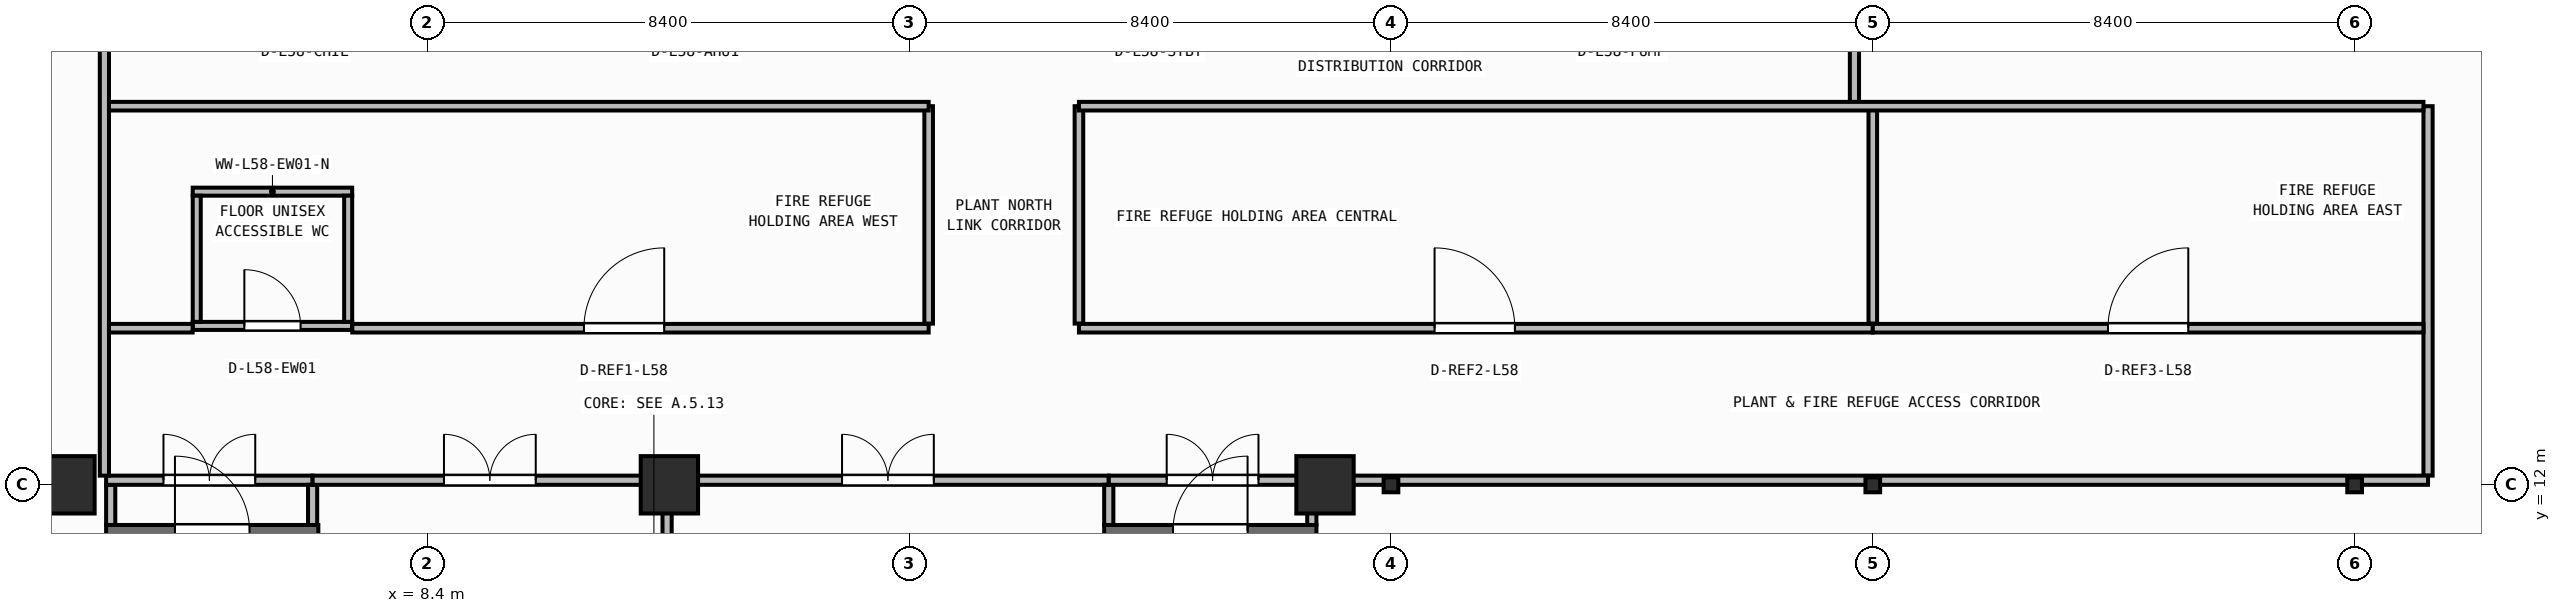
"""IFC4 building model, lengths in metres.
Left out: names, types, materials, properties, quantities, classifications, styles, units other than length and angle.
Written with IfcOpenShell. Run it as: python <this file> out.ifc"""

import sys

from ifc_helpers import new_model, si_unit, direction, frame, frame_2d, origin, origin_2d, place, context, subcontext, project, spatial, rectangle, i_section, extrude, element, fill, save


model = new_model("IFC4")
c1 = context("Model", 3, precision=1e-05, world=origin(), true_north=direction((0.0, 1.0)))
c2 = subcontext(c1, "Body", "Model", "MODEL_VIEW")
j1 = project(units=[si_unit("LENGTHUNIT", "METRE"), si_unit("PLANEANGLEUNIT", "RADIAN")], contexts=[c1])
p1 = place(None, origin())
s1 = spatial("IfcSite", under=j1, at=p1, CompositionType="ELEMENT")
p2 = place(p1, origin())
s2 = spatial("IfcBuilding", under=s1, at=p2, CompositionType="ELEMENT")
p3 = place(p2, frame((0.0, 0.0, 235.55)))
s3 = spatial("IfcBuildingStorey", under=s2, at=p3, CompositionType="ELEMENT", Elevation=235.55)
for number, where, z_axis, x_axis in (
    (1, (2.1, 12.0, 0.0), (0.0, 0.0, 1.0), (1.0, 0.0, 0.0)),
    (2, (12.62, 12.0, 0.0), (0.0, 0.0, 1.0), (1.0, 0.0, 0.0)),
    (3, (24.05, 12.0, 0.0), (0.0, 0.0, 1.0), (1.0, 0.0, 0.0)),
):
    element("IfcColumn", number, at=place(p3, frame(where, z_axis=z_axis, x_axis=x_axis)), inside=s3, PredefinedType="COLUMN", context=c2, shape_type="SweptSolid", body=[
        extrude(rectangle(XDim=1.0, YDim=1.0, at=origin_2d()), origin(), (0.0, 0.0, 1.0), 5.2),
    ])
for number, where, z_axis, x_axis in (
    (4, (25.2, 12.0, 0.0), (0.0, 0.0, 1.0), (1.0, 0.0, 0.0)),
    (5, (33.6, 12.0, 0.0), (0.0, 0.0, 1.0), (1.0, 0.0, 0.0)),
    (6, (42.0, 12.0, 0.0), (0.0, 0.0, 1.0), (1.0, 0.0, 0.0)),
):
    element("IfcColumn", number, at=place(p3, frame(where, z_axis=z_axis, x_axis=x_axis)), inside=s3, PredefinedType="COLUMN", context=c2, shape_type="SweptSolid", body=[
        extrude(i_section(OverallWidth=0.256, OverallDepth=0.26, WebThickness=0.01, FlangeThickness=0.017, FilletRadius=0.013, at=origin_2d()), origin(), (0.0, 0.0, 1.0), 5.2),
    ])
p4 = place(p3, frame((2.8, 11.2, 0.0), z_axis=(0.0, 0.0, 1.0), x_axis=(1.0, 0.0, 0.0)))
e7 = element("IfcWall", 7, at=p4, inside=s3, PredefinedType="SHEAR", context=c2, shape_type="SweptSolid", body=[
    extrude(rectangle(XDim=3.7, YDim=0.2, at=frame_2d((1.85, 0.0))), origin(), (0.0, 0.0, 1.0), 4.96),
])
p5 = place(p4, frame((1.2, 0.0, 0.0)))
e8 = element("IfcOpeningElement", 8, at=p5, cuts=e7, PredefinedType="OPENING", context=c2, shape_type="SweptSolid", body=[
    extrude(rectangle(XDim=1.3, YDim=2.15, at=frame_2d((0.65, 1.075))), frame((0.0, 0.11, 0.0), z_axis=(0.0, -1.0, 0.0), x_axis=(1.0, 0.0, 0.0)), (0.0, 0.0, 1.0), 0.22),
])
p6 = place(p3, frame((20.2, 11.2, 0.0), z_axis=(0.0, 0.0, 1.0), x_axis=(1.0, 0.0, 0.0)))
e9 = element("IfcWall", 9, at=p6, inside=s3, PredefinedType="SHEAR", context=c2, shape_type="SweptSolid", body=[
    extrude(rectangle(XDim=3.7, YDim=0.2, at=frame_2d((1.85, 0.0))), origin(), (0.0, 0.0, 1.0), 4.96),
])
p7 = place(p6, frame((1.2, 0.0, 0.0)))
e10 = element("IfcOpeningElement", 10, at=p7, cuts=e9, PredefinedType="OPENING", context=c2, shape_type="SweptSolid", body=[
    extrude(rectangle(XDim=1.3, YDim=2.15, at=frame_2d((0.65, 1.075))), frame((0.0, 0.11, 0.0), z_axis=(0.0, -1.0, 0.0), x_axis=(1.0, 0.0, 0.0)), (0.0, 0.0, 1.0), 0.22),
])
p8 = place(p3, frame((2.88, 11.3, 0.0), z_axis=(0.0, 0.0, 1.0), x_axis=(0.0, 1.0, 0.0)))
e11 = element("IfcWall", 11, at=p8, inside=s3, PredefinedType="PARTITIONING", context=c2, shape_type="SweptSolid", body=[
    extrude(rectangle(XDim=0.7, YDim=0.16, at=frame_2d((0.35, 0.0))), origin(), (0.0, 0.0, 1.0), 4.96),
])
p9 = place(p3, frame((2.8, 12.08, 0.0), z_axis=(0.0, 0.0, 1.0), x_axis=(1.0, 0.0, 0.0)))
e12 = element("IfcWall", 12, at=p9, inside=s3, PredefinedType="PARTITIONING", context=c2, shape_type="SweptSolid", body=[
    extrude(rectangle(XDim=3.6, YDim=0.16, at=frame_2d((1.8, 0.0))), origin(), (0.0, 0.0, 1.0), 4.235),
])
p10 = place(p9, frame((1.0, 0.0, 0.0)))
e13 = element("IfcOpeningElement", 13, at=p10, cuts=e12, PredefinedType="OPENING", context=c2, shape_type="SweptSolid", body=[
    extrude(rectangle(XDim=1.6, YDim=2.05, at=frame_2d((0.8, 1.025))), frame((0.0, 0.09, 0.0), z_axis=(0.0, -1.0, 0.0), x_axis=(1.0, 0.0, 0.0)), (0.0, 0.0, 1.0), 0.18),
])
p11 = place(p3, frame((6.4, 11.3, 0.0), z_axis=(0.0, 0.0, 1.0), x_axis=(0.0, 1.0, 0.0)))
e14 = element("IfcWall", 14, at=p11, inside=s3, PredefinedType="PARTITIONING", context=c2, shape_type="SweptSolid", body=[
    extrude(rectangle(XDim=0.7, YDim=0.16, at=frame_2d((0.35, 0.0))), origin(), (0.0, 0.0, 1.0), 4.96),
])
p12 = place(p3, frame((6.4, 12.08, 0.0), z_axis=(0.0, 0.0, 1.0), x_axis=(1.0, 0.0, 0.0)))
e15 = element("IfcWall", 15, at=p12, inside=s3, PredefinedType="PARTITIONING", context=c2, shape_type="SweptSolid", body=[
    extrude(rectangle(XDim=6.18, YDim=0.16, at=frame_2d((3.09, 0.0))), origin(), (0.0, 0.0, 1.0), 4.235),
])
p13 = place(p12, frame((2.29, 0.0, 0.0)))
e16 = element("IfcOpeningElement", 16, at=p13, cuts=e15, PredefinedType="OPENING", context=c2, shape_type="SweptSolid", body=[
    extrude(rectangle(XDim=1.6, YDim=2.05, at=frame_2d((0.8, 1.025))), frame((0.0, 0.09, 0.0), z_axis=(0.0, -1.0, 0.0), x_axis=(1.0, 0.0, 0.0)), (0.0, 0.0, 1.0), 0.18),
])
p14 = place(p3, frame((12.58, 9.21, 0.0), z_axis=(0.0, 0.0, 1.0), x_axis=(0.0, 1.0, 0.0)))
e17 = element("IfcWall", 17, at=p14, inside=s3, PredefinedType="PARTITIONING", context=c2, shape_type="SweptSolid", body=[
    extrude(rectangle(XDim=2.79, YDim=0.16, at=frame_2d((1.395, 0.0))), origin(), (0.0, 0.0, 1.0), 4.96),
])
p15 = place(p3, frame((12.58, 12.08, 0.0), z_axis=(0.0, 0.0, 1.0), x_axis=(1.0, 0.0, 0.0)))
e18 = element("IfcWall", 18, at=p15, inside=s3, PredefinedType="PARTITIONING", context=c2, shape_type="SweptSolid", body=[
    extrude(rectangle(XDim=7.7, YDim=0.16, at=frame_2d((3.85, 0.0))), origin(), (0.0, 0.0, 1.0), 4.235),
])
p16 = place(p15, frame((3.05, 0.0, 0.0)))
e19 = element("IfcOpeningElement", 19, at=p16, cuts=e18, PredefinedType="OPENING", context=c2, shape_type="SweptSolid", body=[
    extrude(rectangle(XDim=1.6, YDim=2.05, at=frame_2d((0.8, 1.025))), frame((0.0, 0.09, 0.0), z_axis=(0.0, -1.0, 0.0), x_axis=(1.0, 0.0, 0.0)), (0.0, 0.0, 1.0), 0.18),
])
p17 = place(p3, frame((20.28, 11.3, 0.0), z_axis=(0.0, 0.0, 1.0), x_axis=(0.0, 1.0, 0.0)))
e20 = element("IfcWall", 20, at=p17, inside=s3, PredefinedType="PARTITIONING", context=c2, shape_type="SweptSolid", body=[
    extrude(rectangle(XDim=0.7, YDim=0.16, at=frame_2d((0.35, 0.0))), origin(), (0.0, 0.0, 1.0), 4.96),
])
p18 = place(p3, frame((20.28, 12.08, 0.0), z_axis=(0.0, 0.0, 1.0), x_axis=(1.0, 0.0, 0.0)))
e21 = element("IfcWall", 21, at=p18, inside=s3, PredefinedType="PARTITIONING", context=c2, shape_type="SweptSolid", body=[
    extrude(rectangle(XDim=3.62, YDim=0.16, at=frame_2d((1.81, 0.0))), origin(), (0.0, 0.0, 1.0), 4.235),
])
p19 = place(p18, frame((1.01, 0.0, 0.0)))
e22 = element("IfcOpeningElement", 22, at=p19, cuts=e21, PredefinedType="OPENING", context=c2, shape_type="SweptSolid", body=[
    extrude(rectangle(XDim=1.6, YDim=2.05, at=frame_2d((0.8, 1.025))), frame((0.0, 0.09, 0.0), z_axis=(0.0, -1.0, 0.0), x_axis=(1.0, 0.0, 0.0)), (0.0, 0.0, 1.0), 0.18),
])
p20 = place(p3, frame((23.82, 11.3, 0.0), z_axis=(0.0, 0.0, 1.0), x_axis=(0.0, 1.0, 0.0)))
e23 = element("IfcWall", 23, at=p20, inside=s3, PredefinedType="PARTITIONING", context=c2, shape_type="SweptSolid", body=[
    extrude(rectangle(XDim=0.7, YDim=0.16, at=frame_2d((0.35, 0.0))), origin(), (0.0, 0.0, 1.0), 4.96),
])
p21 = place(p3, frame((4.31, 14.77, 0.0), z_axis=(0.0, 0.0, 1.0), x_axis=(1.0, 0.0, 0.0)))
e24 = element("IfcWall", 24, at=p21, inside=s3, PredefinedType="PARTITIONING", context=c2, shape_type="SweptSolid", body=[
    extrude(rectangle(XDim=2.78, YDim=0.14, at=frame_2d((1.39, 0.0))), origin(), (0.0, 0.0, 1.0), 4.96),
])
p22 = place(p21, frame((0.9, 0.0, 0.0)))
e25 = element("IfcOpeningElement", 25, at=p22, cuts=e24, PredefinedType="OPENING", context=c2, shape_type="SweptSolid", body=[
    extrude(rectangle(XDim=0.98, YDim=2.1, at=frame_2d((0.49, 1.05))), frame((0.0, 0.08, 0.0), z_axis=(0.0, -1.0, 0.0), x_axis=(1.0, 0.0, 0.0)), (0.0, 0.0, 1.0), 0.16),
])
p23 = place(p3, frame((4.31, 17.11, 0.0), z_axis=(0.0, 0.0, 1.0), x_axis=(1.0, 0.0, 0.0)))
e26 = element("IfcWall", 26, at=p23, inside=s3, PredefinedType="PARTITIONING", context=c2, shape_type="SweptSolid", body=[
    extrude(rectangle(XDim=2.78, YDim=0.14, at=frame_2d((1.39, 0.0))), origin(), (0.0, 0.0, 1.0), 4.96),
])
for number, where, z_axis, x_axis in (
    (27, (4.38, 14.84, 0.0), (0.0, 0.0, 1.0), (0.0, 1.0, 0.0)),
    (28, (7.02, 14.84, 0.0), (0.0, 0.0, 1.0), (0.0, 1.0, 0.0)),
):
    element("IfcWall", number, at=place(p3, frame(where, z_axis=z_axis, x_axis=x_axis)), inside=s3, PredefinedType="PARTITIONING", context=c2, shape_type="SweptSolid", body=[
        extrude(rectangle(XDim=2.2, YDim=0.14, at=frame_2d((1.1, 0.0))), origin(), (0.0, 0.0, 1.0), 4.96),
    ])
p24 = place(p3, frame((2.77, 12.16, 0.0), z_axis=(0.0, 0.0, 1.0), x_axis=(0.0, 1.0, 0.0)))
e29 = element("IfcWall", 29, at=p24, inside=s3, PredefinedType="PARTITIONING", context=c2, shape_type="SweptSolid", body=[
    extrude(rectangle(XDim=16.04, YDim=0.16, at=frame_2d((8.02, 0.0))), origin(), (0.0, 0.0, 1.0), 4.96),
])
p25 = place(p3, frame((33.28, 18.6, 0.0), z_axis=(0.0, 0.0, 1.0), x_axis=(0.0, 1.0, 0.0)))
e30 = element("IfcWall", 30, at=p25, inside=s3, PredefinedType="PARTITIONING", context=c2, shape_type="SweptSolid", body=[
    extrude(rectangle(XDim=9.6, YDim=0.16, at=frame_2d((4.8, 0.0))), origin(), (0.0, 0.0, 1.0), 4.407),
])
p26 = place(p3, frame((43.28, 12.16, 0.0), z_axis=(0.0, 0.0, 1.0), x_axis=(0.0, 1.0, 0.0)))
e31 = element("IfcWall", 31, at=p26, inside=s3, PredefinedType="PARTITIONING", context=c2, shape_type="SweptSolid", body=[
    extrude(rectangle(XDim=6.44, YDim=0.16, at=frame_2d((3.22, 0.0))), origin(), (0.0, 0.0, 1.0), 4.96),
])
p27 = place(p3, frame((23.92, 12.08, 0.0), z_axis=(0.0, 0.0, 1.0), x_axis=(1.0, 0.0, 0.0)))
e32 = element("IfcWall", 32, at=p27, inside=s3, PredefinedType="PARTITIONING", context=c2, shape_type="SweptSolid", body=[
    extrude(rectangle(XDim=19.36, YDim=0.16, at=frame_2d((9.68, 0.0))), origin(), (0.0, 0.0, 1.0), 4.235),
])
p28 = place(p3, frame((2.85, 14.73, 0.0), z_axis=(0.0, 0.0, 1.0), x_axis=(1.0, 0.0, 0.0)))
e33 = element("IfcWall", 33, at=p28, inside=s3, PredefinedType="PARTITIONING", context=c2, shape_type="SweptSolid", body=[
    extrude(rectangle(XDim=1.458, YDim=0.15, at=frame_2d((0.729, 0.0))), origin(), (0.0, 0.0, 1.0), 4.96),
])
p29 = place(p3, frame((7.092, 14.73, 0.0), z_axis=(0.0, 0.0, 1.0), x_axis=(1.0, 0.0, 0.0)))
e34 = element("IfcWall", 34, at=p29, inside=s3, PredefinedType="PARTITIONING", context=c2, shape_type="SweptSolid", body=[
    extrude(rectangle(XDim=10.048, YDim=0.15, at=frame_2d((5.024, 0.0))), origin(), (0.0, 0.0, 1.0), 4.96),
])
p30 = place(p29, frame((4.038, 0.0, 0.0)))
e35 = element("IfcOpeningElement", 35, at=p30, cuts=e34, PredefinedType="OPENING", context=c2, shape_type="SweptSolid", body=[
    extrude(rectangle(XDim=1.4, YDim=2.15, at=frame_2d((0.7, 1.075))), frame((0.0, 0.085, 0.0), z_axis=(0.0, -1.0, 0.0), x_axis=(1.0, 0.0, 0.0)), (0.0, 0.0, 1.0), 0.17),
])
p31 = place(p3, frame((17.14, 14.81, 0.0), z_axis=(0.0, 0.0, 1.0), x_axis=(0.0, 1.0, 0.0)))
e36 = element("IfcWall", 36, at=p31, inside=s3, PredefinedType="PARTITIONING", context=c2, shape_type="SweptSolid", body=[
    extrude(rectangle(XDim=3.79, YDim=0.15, at=frame_2d((1.895, 0.0))), origin(), (0.0, 0.0, 1.0), 4.96),
])
p32 = place(p3, frame((2.85, 18.6, 0.0), z_axis=(0.0, 0.0, 1.0), x_axis=(1.0, 0.0, 0.0)))
e37 = element("IfcWall", 37, at=p32, inside=s3, PredefinedType="PARTITIONING", context=c2, shape_type="SweptSolid", body=[
    extrude(rectangle(XDim=14.29, YDim=0.15, at=frame_2d((7.145, 0.0))), origin(), (0.0, 0.0, 1.0), 4.96),
])
p33 = place(p3, frame((19.76, 14.81, 0.0), z_axis=(0.0, 0.0, 1.0), x_axis=(0.0, 1.0, 0.0)))
e38 = element("IfcWall", 38, at=p33, inside=s3, PredefinedType="PARTITIONING", context=c2, shape_type="SweptSolid", body=[
    extrude(rectangle(XDim=3.79, YDim=0.15, at=frame_2d((1.895, 0.0))), origin(), (0.0, 0.0, 1.0), 4.96),
])
p34 = place(p3, frame((19.76, 14.73, 0.0), z_axis=(0.0, 0.0, 1.0), x_axis=(1.0, 0.0, 0.0)))
e39 = element("IfcWall", 39, at=p34, inside=s3, PredefinedType="PARTITIONING", context=c2, shape_type="SweptSolid", body=[
    extrude(rectangle(XDim=13.84, YDim=0.15, at=frame_2d((6.92, 0.0))), origin(), (0.0, 0.0, 1.0), 4.96),
])
p35 = place(p34, frame((6.2, 0.0, 0.0)))
e40 = element("IfcOpeningElement", 40, at=p35, cuts=e39, PredefinedType="OPENING", context=c2, shape_type="SweptSolid", body=[
    extrude(rectangle(XDim=1.4, YDim=2.15, at=frame_2d((0.7, 1.075))), frame((0.0, 0.085, 0.0), z_axis=(0.0, -1.0, 0.0), x_axis=(1.0, 0.0, 0.0)), (0.0, 0.0, 1.0), 0.17),
])
p36 = place(p3, frame((33.6, 14.81, 0.0), z_axis=(0.0, 0.0, 1.0), x_axis=(0.0, 1.0, 0.0)))
e41 = element("IfcWall", 41, at=p36, inside=s3, PredefinedType="PARTITIONING", context=c2, shape_type="SweptSolid", body=[
    extrude(rectangle(XDim=3.79, YDim=0.15, at=frame_2d((1.895, 0.0))), origin(), (0.0, 0.0, 1.0), 4.407),
])
p37 = place(p3, frame((33.6, 14.73, 0.0), z_axis=(0.0, 0.0, 1.0), x_axis=(1.0, 0.0, 0.0)))
e42 = element("IfcWall", 42, at=p37, inside=s3, PredefinedType="PARTITIONING", context=c2, shape_type="SweptSolid", body=[
    extrude(rectangle(XDim=9.6, YDim=0.15, at=frame_2d((4.8, 0.0))), origin(), (0.0, 0.0, 1.0), 4.96),
])
p38 = place(p37, frame((4.1, 0.0, 0.0)))
e43 = element("IfcOpeningElement", 43, at=p38, cuts=e42, PredefinedType="OPENING", context=c2, shape_type="SweptSolid", body=[
    extrude(rectangle(XDim=1.4, YDim=2.15, at=frame_2d((0.7, 1.075))), frame((0.0, 0.085, 0.0), z_axis=(0.0, -1.0, 0.0), x_axis=(1.0, 0.0, 0.0)), (0.0, 0.0, 1.0), 0.17),
])
p39 = place(p3, frame((19.76, 18.6, 0.0), z_axis=(0.0, 0.0, 1.0), x_axis=(1.0, 0.0, 0.0)))
e44 = element("IfcWall", 44, at=p39, inside=s3, PredefinedType="PARTITIONING", context=c2, shape_type="SweptSolid", body=[
    extrude(rectangle(XDim=23.44, YDim=0.15, at=frame_2d((11.72, 0.0))), origin(), (0.0, 0.0, 1.0), 4.96),
])
p40 = place(p5, origin())
e45 = element("IfcDoor", 45, at=p40, inside=s3, OperationType="SINGLE_SWING_LEFT", PredefinedType="DOOR", context=c2, shape_type="SweptSolid", body=[
    extrude(rectangle(XDim=1.3, YDim=2.15, at=frame_2d((0.65, 1.075))), frame((0.0, 0.025, 0.0), z_axis=(0.0, -1.0, 0.0), x_axis=(1.0, 0.0, 0.0)), (0.0, 0.0, 1.0), 0.05),
])
fill(e8, e45)
p41 = place(p7, origin())
e46 = element("IfcDoor", 46, at=p41, inside=s3, OperationType="SINGLE_SWING_RIGHT", PredefinedType="DOOR", context=c2, shape_type="SweptSolid", body=[
    extrude(rectangle(XDim=1.3, YDim=2.15, at=frame_2d((0.65, 1.075))), frame((0.0, 0.025, 0.0), z_axis=(0.0, -1.0, 0.0), x_axis=(1.0, 0.0, 0.0)), (0.0, 0.0, 1.0), 0.05),
])
fill(e10, e46)
p42 = place(p10, origin())
e47 = element("IfcDoor", 47, at=p42, inside=s3, OperationType="DOUBLE_DOOR_SINGLE_SWING", PredefinedType="DOOR", context=c2, shape_type="SweptSolid", body=[
    extrude(rectangle(XDim=1.6, YDim=2.05, at=frame_2d((0.8, 1.025))), frame((0.0, 0.025, 0.0), z_axis=(0.0, -1.0, 0.0), x_axis=(1.0, 0.0, 0.0)), (0.0, 0.0, 1.0), 0.05),
])
fill(e13, e47)
p43 = place(p13, origin())
e48 = element("IfcDoor", 48, at=p43, inside=s3, OperationType="DOUBLE_DOOR_SINGLE_SWING", PredefinedType="DOOR", context=c2, shape_type="SweptSolid", body=[
    extrude(rectangle(XDim=1.6, YDim=2.05, at=frame_2d((0.8, 1.025))), frame((0.0, 0.025, 0.0), z_axis=(0.0, -1.0, 0.0), x_axis=(1.0, 0.0, 0.0)), (0.0, 0.0, 1.0), 0.05),
])
fill(e16, e48)
p44 = place(p16, origin())
e49 = element("IfcDoor", 49, at=p44, inside=s3, OperationType="DOUBLE_DOOR_SINGLE_SWING", PredefinedType="DOOR", context=c2, shape_type="SweptSolid", body=[
    extrude(rectangle(XDim=1.6, YDim=2.05, at=frame_2d((0.8, 1.025))), frame((0.0, 0.025, 0.0), z_axis=(0.0, -1.0, 0.0), x_axis=(1.0, 0.0, 0.0)), (0.0, 0.0, 1.0), 0.05),
])
fill(e19, e49)
p45 = place(p19, origin())
e50 = element("IfcDoor", 50, at=p45, inside=s3, OperationType="DOUBLE_DOOR_SINGLE_SWING", PredefinedType="DOOR", context=c2, shape_type="SweptSolid", body=[
    extrude(rectangle(XDim=1.6, YDim=2.05, at=frame_2d((0.8, 1.025))), frame((0.0, 0.025, 0.0), z_axis=(0.0, -1.0, 0.0), x_axis=(1.0, 0.0, 0.0)), (0.0, 0.0, 1.0), 0.05),
])
fill(e22, e50)
p46 = place(p22, origin())
e51 = element("IfcDoor", 51, at=p46, inside=s3, OperationType="SINGLE_SWING_LEFT", PredefinedType="DOOR", context=c2, shape_type="SweptSolid", body=[
    extrude(rectangle(XDim=0.98, YDim=2.1, at=frame_2d((0.49, 1.05))), frame((0.0, 0.025, 0.0), z_axis=(0.0, -1.0, 0.0), x_axis=(1.0, 0.0, 0.0)), (0.0, 0.0, 1.0), 0.05),
])
fill(e25, e51)
p47 = place(p30, origin())
e52 = element("IfcDoor", 52, at=p47, inside=s3, OperationType="SINGLE_SWING_RIGHT", PredefinedType="DOOR", context=c2, shape_type="SweptSolid", body=[
    extrude(rectangle(XDim=1.4, YDim=2.15, at=frame_2d((0.7, 1.075))), frame((0.0, 0.025, 0.0), z_axis=(0.0, -1.0, 0.0), x_axis=(1.0, 0.0, 0.0)), (0.0, 0.0, 1.0), 0.05),
])
fill(e35, e52)
p48 = place(p35, origin())
e53 = element("IfcDoor", 53, at=p48, inside=s3, OperationType="SINGLE_SWING_LEFT", PredefinedType="DOOR", context=c2, shape_type="SweptSolid", body=[
    extrude(rectangle(XDim=1.4, YDim=2.15, at=frame_2d((0.7, 1.075))), frame((0.0, 0.025, 0.0), z_axis=(0.0, -1.0, 0.0), x_axis=(1.0, 0.0, 0.0)), (0.0, 0.0, 1.0), 0.05),
])
fill(e40, e53)
p49 = place(p38, origin())
e54 = element("IfcDoor", 54, at=p49, inside=s3, OperationType="SINGLE_SWING_RIGHT", PredefinedType="DOOR", context=c2, shape_type="SweptSolid", body=[
    extrude(rectangle(XDim=1.4, YDim=2.15, at=frame_2d((0.7, 1.075))), frame((0.0, 0.025, 0.0), z_axis=(0.0, -1.0, 0.0), x_axis=(1.0, 0.0, 0.0)), (0.0, 0.0, 1.0), 0.05),
])
fill(e43, e54)
save(model, sys.argv[1])
